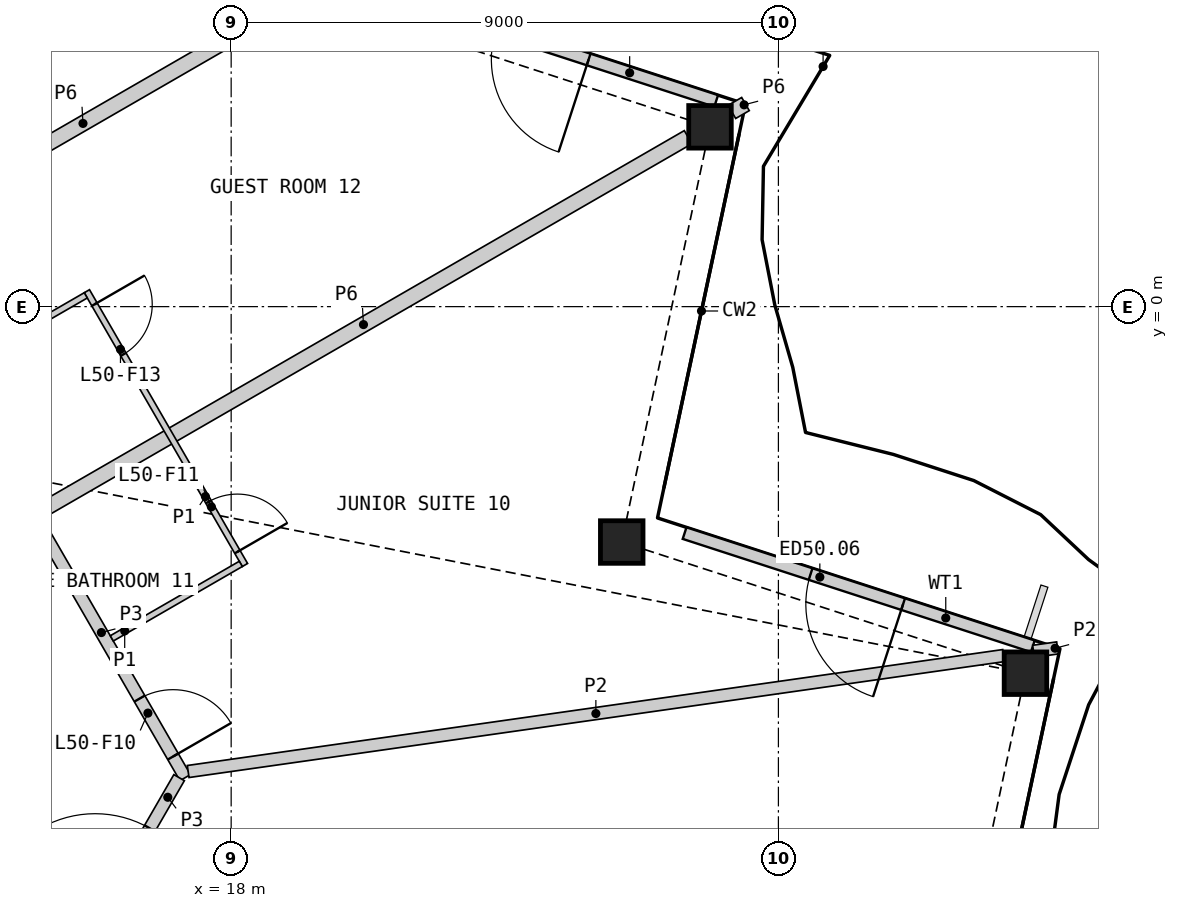
"""IFC4 building model, lengths in metres.
Left out: names, types, materials, properties, quantities, classifications, styles, units other than length and angle.
Written with IfcOpenShell. Run it as: python <this file> out.ifc"""

import sys

from ifc_helpers import new_model, si_unit, direction, frame, frame_2d, origin, origin_2d, place, context, subcontext, project, spatial, rectangle, hollow_rectangle, extrude, element, fill, save


model = new_model("IFC4")
c1 = context("Model", 3, precision=1e-05, world=origin(), true_north=direction((0.0, 1.0)))
c2 = subcontext(c1, "Body", "Model", "MODEL_VIEW")
j1 = project(units=[si_unit("LENGTHUNIT", "METRE"), si_unit("PLANEANGLEUNIT", "RADIAN")], contexts=[c1])
p1 = place(None, origin())
s1 = spatial("IfcSite", under=j1, at=p1, CompositionType="ELEMENT")
p2 = place(p1, origin())
s2 = spatial("IfcBuilding", under=s1, at=p2, CompositionType="ELEMENT")
p3 = place(p2, frame((0.0, 0.0, 231.0)))
s3 = spatial("IfcBuildingStorey", under=s2, at=p3, CompositionType="ELEMENT", Elevation=231.0)
for number, where, z_axis, x_axis in (
    (1, (31.063, -6.029, 0.0), (0.0, 0.0, 1.0), (1.0, 0.0, 0.0)),
    (2, (24.423, -3.872, 0.0), (0.0, 0.0, 1.0), (1.0, 0.0, 0.0)),
    (3, (25.875, 2.957, 0.0), (0.0, 0.0, 1.0), (1.0, 0.0, 0.0)),
):
    element("IfcColumn", number, at=place(p3, frame(where, z_axis=z_axis, x_axis=x_axis)), inside=s3, PredefinedType="COLUMN", context=c2, shape_type="SweptSolid", body=[
        extrude(hollow_rectangle(XDim=0.7, YDim=0.7, WallThickness=0.045, at=origin_2d()), origin(), (0.0, 0.0, 1.0), 3.6),
    ])
p4 = place(p3, frame((31.184, -5.586, 0.0), z_axis=(0.0, 0.0, 1.0), x_axis=(-0.95106415783, 0.30899347516, 0.0)))
e4 = element("IfcWall", 4, at=p4, inside=s3, PredefinedType="SOLIDWALL", context=c2, shape_type="SweptSolid", body=[
    extrude(rectangle(XDim=6.021, YDim=0.2, at=frame_2d((3.011, 0.0))), origin(), (0.0, 0.0, 1.0), 2.701),
])
p5 = place(p4, frame((2.243, 0.0, 0.0)))
e5 = element("IfcOpeningElement", 5, at=p5, cuts=e4, PredefinedType="OPENING", context=c2, shape_type="SweptSolid", body=[
    extrude(rectangle(XDim=1.6, YDim=2.4, at=frame_2d((0.8, 1.2))), frame((0.0, 0.11, 0.0), z_axis=(0.0, -1.0, 0.0), x_axis=(1.0, 0.0, 0.0)), (0.0, 0.0, 1.0), 0.22),
])
p6 = place(p3, frame((25.977, 3.383, 0.0), z_axis=(0.0, 0.0, 1.0), x_axis=(-0.951062846307, 0.308997511922, 0.0)))
e6 = element("IfcWall", 6, at=p6, inside=s3, PredefinedType="SOLIDWALL", context=c2, shape_type="SweptSolid", body=[
    extrude(rectangle(XDim=5.984, YDim=0.2, at=frame_2d((2.992, 0.0))), origin(), (0.0, 0.0, 1.0), 2.701),
])
p7 = place(p6, frame((2.206, 0.0, 0.0)))
e7 = element("IfcOpeningElement", 7, at=p7, cuts=e6, PredefinedType="OPENING", context=c2, shape_type="SweptSolid", body=[
    extrude(rectangle(XDim=1.6, YDim=2.4, at=frame_2d((0.8, 1.2))), frame((0.0, 0.11, 0.0), z_axis=(0.0, -1.0, 0.0), x_axis=(1.0, 0.0, 0.0)), (0.0, 0.0, 1.0), 0.22),
])
p8 = place(p3, frame((14.837, -3.378, 0.0), z_axis=(0.0, 0.0, 1.0), x_axis=(0.866021706022, 0.500006404657, 0.0)))
e8 = element("IfcWall", 8, at=p8, inside=s3, PredefinedType="PARTITIONING", context=c2, shape_type="SweptSolid", body=[
    extrude(rectangle(XDim=12.33, YDim=0.25, at=frame_2d((6.165, 0.0))), origin(), (0.0, 0.0, 1.0), 2.404),
])
p9 = place(p3, frame((12.251, 1.101, 0.0), z_axis=(0.0, 0.0, 1.0), x_axis=(0.866020808234, 0.500007959642, 0.0)))
e9 = element("IfcWall", 9, at=p9, inside=s3, PredefinedType="PARTITIONING", context=c2, shape_type="SweptSolid", body=[
    extrude(rectangle(XDim=7.649, YDim=0.25, at=frame_2d((3.824, 0.0))), origin(), (0.0, 0.0, 1.0), 2.404),
])
p10 = place(p3, frame((14.489, -2.975, 0.0), z_axis=(0.0, 0.0, 1.0), x_axis=(0.500017753321, -0.866015153657, 0.0)))
e10 = element("IfcWall", 10, at=p10, inside=s3, PredefinedType="PARTITIONING", context=c2, shape_type="SweptSolid", body=[
    extrude(rectangle(XDim=5.51, YDim=0.2, at=frame_2d((2.755, 0.0))), origin(), (0.0, 0.0, 1.0), 3.25),
])
p11 = place(p10, frame((4.01, 0.0, 0.0)))
e11 = element("IfcOpeningElement", 11, at=p11, cuts=e10, PredefinedType="OPENING", context=c2, shape_type="SweptSolid", body=[
    extrude(rectangle(XDim=1.1, YDim=2.1, at=frame_2d((0.55, 1.05))), frame((0.0, 0.11, 0.0), z_axis=(0.0, -1.0, 0.0), x_axis=(1.0, 0.0, 0.0)), (0.0, 0.0, 1.0), 0.22),
])
p12 = place(p3, frame((15.281, -10.974, 0.0), z_axis=(0.0, 0.0, 1.0), x_axis=(0.499958791762, 0.866049194065, 0.0)))
e12 = element("IfcWall", 12, at=p12, inside=s3, PredefinedType="PARTITIONING", context=c2, shape_type="SweptSolid", body=[
    extrude(rectangle(XDim=3.726, YDim=0.2, at=frame_2d((1.863, 0.0))), origin(), (0.0, 0.0, 1.0), 3.25),
])
p13 = place(p12, frame((0.963, 0.0, 0.0)))
e13 = element("IfcOpeningElement", 13, at=p13, cuts=e12, PredefinedType="OPENING", context=c2, shape_type="SweptSolid", body=[
    extrude(rectangle(XDim=1.8, YDim=2.1, at=frame_2d((0.9, 1.05))), frame((0.0, 0.11, 0.0), z_axis=(0.0, -1.0, 0.0), x_axis=(1.0, 0.0, 0.0)), (0.0, 0.0, 1.0), 0.22),
])
p14 = place(p3, frame((26.235, 3.203, 0.0), z_axis=(0.0, 0.0, 1.0), x_axis=(0.86596515875, 0.500104332946, 0.0)))
e14 = element("IfcWall", 14, at=p14, inside=s3, PredefinedType="PARTITIONING", context=c2, shape_type="SweptSolid", body=[
    extrude(rectangle(XDim=0.258, YDim=0.25, at=frame_2d((0.129, 0.0))), origin(), (0.0, 0.0, 1.0), 2.404),
])
p15 = place(p3, frame((17.293, -7.646, 0.0), z_axis=(0.0, 0.0, 1.0), x_axis=(0.990042285303, 0.140770285614, 0.0)))
e15 = element("IfcWall", 15, at=p15, inside=s3, PredefinedType="PARTITIONING", context=c2, shape_type="SweptSolid", body=[
    extrude(rectangle(XDim=13.545, YDim=0.2, at=frame_2d((6.772, 0.0))), origin(), (0.0, 0.0, 1.0), 2.404),
])
p16 = place(p3, frame((31.196, -5.669, 0.0), z_axis=(0.0, 0.0, 1.0), x_axis=(0.990010701632, 0.140992236146, 0.0)))
e16 = element("IfcWall", 16, at=p16, inside=s3, PredefinedType="PARTITIONING", context=c2, shape_type="SweptSolid", body=[
    extrude(rectangle(XDim=0.398, YDim=0.2, at=frame_2d((0.199, 0.0))), origin(), (0.0, 0.0, 1.0), 2.404),
])
p17 = place(p3, frame((15.627, 0.254, 0.0), z_axis=(0.0, 0.0, 1.0), x_axis=(0.500027264788, -0.866009661879, 0.0)))
e17 = element("IfcWall", 17, at=p17, inside=s3, PredefinedType="PARTITIONING", context=c2, shape_type="SweptSolid", body=[
    extrude(rectangle(XDim=5.2, YDim=0.1, at=frame_2d((2.6, 0.0))), origin(), (0.0, 0.0, 1.0), 2.404),
])
p18 = place(p17, frame((4.0, 0.0, 0.0)))
e18 = element("IfcOpeningElement", 18, at=p18, cuts=e17, PredefinedType="OPENING", context=c2, shape_type="SweptSolid", body=[
    extrude(rectangle(XDim=0.95, YDim=2.1, at=frame_2d((0.475, 1.05))), frame((0.0, 0.06, 0.0), z_axis=(0.0, -1.0, 0.0), x_axis=(1.0, 0.0, 0.0)), (0.0, 0.0, 1.0), 0.12),
])
p19 = place(p17, frame((0.25, 0.0, 0.0)))
e19 = element("IfcOpeningElement", 19, at=p19, cuts=e17, PredefinedType="OPENING", context=c2, shape_type="SweptSolid", body=[
    extrude(rectangle(XDim=0.95, YDim=2.1, at=frame_2d((0.475, 1.05))), frame((0.0, 0.06, 0.0), z_axis=(0.0, -1.0, 0.0), x_axis=(1.0, 0.0, 0.0)), (0.0, 0.0, 1.0), 0.12),
])
p20 = place(p3, frame((16.037, -5.456, 0.0), z_axis=(0.0, 0.0, 1.0), x_axis=(0.865989751695, 0.500061746146, 0.0)))
e20 = element("IfcWall", 20, at=p20, inside=s3, PredefinedType="PARTITIONING", context=c2, shape_type="SweptSolid", body=[
    extrude(rectangle(XDim=2.45, YDim=0.1, at=frame_2d((1.225, 0.0))), origin(), (0.0, 0.0, 1.0), 2.404),
])
p21 = place(p3, frame((13.487, -1.04, 0.0), z_axis=(0.0, 0.0, 1.0), x_axis=(0.866032905446, 0.499987006516, 0.0)))
e21 = element("IfcWall", 21, at=p21, inside=s3, PredefinedType="PARTITIONING", context=c2, shape_type="SweptSolid", body=[
    extrude(rectangle(XDim=2.45, YDim=0.1, at=frame_2d((1.225, 0.0))), origin(), (0.0, 0.0, 1.0), 2.404),
])
p22 = place(p5, origin())
e22 = element("IfcDoor", 22, at=p22, inside=s3, OperationType="DOUBLE_DOOR_SINGLE_SWING", PredefinedType="DOOR", context=c2, shape_type="SweptSolid", body=[
    extrude(rectangle(XDim=1.6, YDim=2.4, at=frame_2d((0.8, 1.2))), frame((0.0, 0.025, 0.0), z_axis=(0.0, -1.0, 0.0), x_axis=(1.0, 0.0, 0.0)), (0.0, 0.0, 1.0), 0.05),
])
fill(e5, e22)
p23 = place(p7, origin())
e23 = element("IfcDoor", 23, at=p23, inside=s3, OperationType="DOUBLE_DOOR_SINGLE_SWING", PredefinedType="DOOR", context=c2, shape_type="SweptSolid", body=[
    extrude(rectangle(XDim=1.6, YDim=2.4, at=frame_2d((0.8, 1.2))), frame((0.0, 0.025, 0.0), z_axis=(0.0, -1.0, 0.0), x_axis=(1.0, 0.0, 0.0)), (0.0, 0.0, 1.0), 0.05),
])
fill(e7, e23)
p24 = place(p13, origin())
e24 = element("IfcDoor", 24, at=p24, inside=s3, OperationType="DOUBLE_DOOR_SINGLE_SWING", PredefinedType="DOOR", context=c2, shape_type="SweptSolid", body=[
    extrude(rectangle(XDim=1.8, YDim=2.1, at=frame_2d((0.9, 1.05))), frame((0.0, 0.025, 0.0), z_axis=(0.0, -1.0, 0.0), x_axis=(1.0, 0.0, 0.0)), (0.0, 0.0, 1.0), 0.05),
])
fill(e13, e24)
p25 = place(p11, origin())
e25 = element("IfcDoor", 25, at=p25, inside=s3, OperationType="SINGLE_SWING_RIGHT", PredefinedType="DOOR", context=c2, shape_type="SweptSolid", body=[
    extrude(rectangle(XDim=1.1, YDim=2.1, at=frame_2d((0.55, 1.05))), frame((0.0, 0.025, 0.0), z_axis=(0.0, -1.0, 0.0), x_axis=(1.0, 0.0, 0.0)), (0.0, 0.0, 1.0), 0.05),
])
fill(e11, e25)
p26 = place(p18, origin())
e26 = element("IfcDoor", 26, at=p26, inside=s3, OperationType="SINGLE_SWING_RIGHT", PredefinedType="DOOR", context=c2, shape_type="SweptSolid", body=[
    extrude(rectangle(XDim=0.95, YDim=2.1, at=frame_2d((0.475, 1.05))), frame((0.0, 0.025, 0.0), z_axis=(0.0, -1.0, 0.0), x_axis=(1.0, 0.0, 0.0)), (0.0, 0.0, 1.0), 0.05),
])
fill(e18, e26)
p27 = place(p19, origin())
e27 = element("IfcDoor", 27, at=p27, inside=s3, OperationType="SINGLE_SWING_LEFT", PredefinedType="DOOR", context=c2, shape_type="SweptSolid", body=[
    extrude(rectangle(XDim=0.95, YDim=2.1, at=frame_2d((0.475, 1.05))), frame((0.0, 0.025, 0.0), z_axis=(0.0, -1.0, 0.0), x_axis=(1.0, 0.0, 0.0)), (0.0, 0.0, 1.0), 0.05),
])
fill(e19, e27)
save(model, sys.argv[1])
